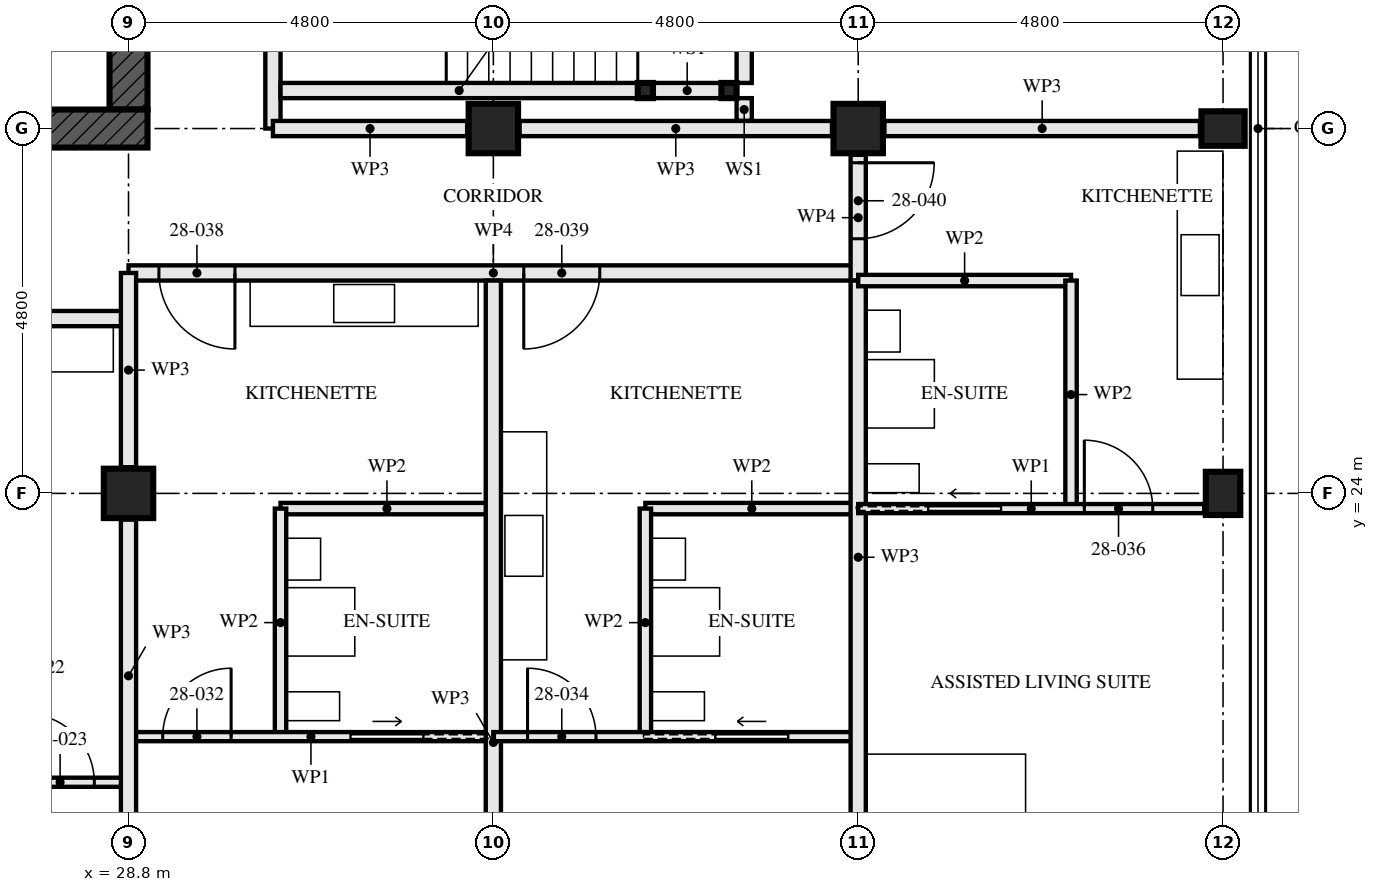
"""IFC4 building model, lengths in metres.
Left out: names, types, materials, properties, quantities, classifications, styles, units other than length and angle.
Written with IfcOpenShell. Run it as: python <this file> out.ifc"""

import sys

from ifc_helpers import new_model, si_unit, direction, frame, frame_2d, origin, origin_2d, place, context, subcontext, project, spatial, rectangle, hollow_rectangle, i_section, extrude, element, fill, save


model = new_model("IFC4")
c1 = context("Model", 3, precision=1e-05, world=origin(), true_north=direction((0.0, 1.0)))
c2 = subcontext(c1, "Body", "Model", "MODEL_VIEW")
j1 = project(units=[si_unit("LENGTHUNIT", "METRE"), si_unit("PLANEANGLEUNIT", "RADIAN")], contexts=[c1])
p1 = place(None, origin())
s1 = spatial("IfcSite", under=j1, at=p1, CompositionType="ELEMENT")
p2 = place(p1, origin())
s2 = spatial("IfcBuilding", under=s1, at=p2, CompositionType="ELEMENT")
p3 = place(p2, frame((0.0, 0.0, 105.0)))
s3 = spatial("IfcBuildingStorey", under=s2, at=p3, CompositionType="ELEMENT", Elevation=105.0)
for number, where, z_axis, x_axis in (
    (1, (28.8, 24.0, 0.0), (0.0, 0.0, 1.0), (1.0, 0.0, 0.0)),
    (2, (33.6, 28.8, 0.0), (0.0, 0.0, 1.0), (0.0, 1.0, 0.0)),
    (3, (38.4, 28.8, 0.0), (0.0, 0.0, 1.0), (0.0, 1.0, 0.0)),
):
    element("IfcColumn", number, at=place(p3, frame(where, z_axis=z_axis, x_axis=x_axis)), inside=s3, PredefinedType="COLUMN", context=c2, shape_type="SweptSolid", body=[
        extrude(hollow_rectangle(XDim=0.65, YDim=0.65, WallThickness=0.05, at=origin_2d()), origin(), (0.0, 0.0, 1.0), 3.5),
    ])
for number, where, z_axis, x_axis in (
    (4, (43.2, 24.0, 0.0), (0.0, 0.0, 1.0), (1.0, 0.0, 0.0)),
    (5, (43.2, 28.8, 0.0), (0.0, 0.0, 1.0), (0.0, 1.0, 0.0)),
):
    element("IfcColumn", number, at=place(p3, frame(where, z_axis=z_axis, x_axis=x_axis)), inside=s3, PredefinedType="COLUMN", context=c2, shape_type="SweptSolid", body=[
        extrude(i_section(OverallWidth=0.454, OverallDepth=0.569, WebThickness=0.078, FlangeThickness=0.125, FilletRadius=0.015, at=origin_2d()), origin(), (0.0, 0.0, 1.0), 3.5),
    ])
p4 = place(p3, frame((14.15, 28.8, -0.17), z_axis=(0.0, 0.0, 1.0), x_axis=(1.0, 0.0, 0.0)))
e6 = element("IfcWall", 6, at=p4, inside=s3, PredefinedType="SHEAR", context=c2, shape_type="SweptSolid", body=[
    extrude(rectangle(XDim=14.9, YDim=0.5, at=frame_2d((7.45, 0.0))), origin(), (0.0, 0.0, 1.0), 3.5),
])
p5 = place(p4, frame((6.85, 0.0, 0.17)))
e7 = element("IfcOpeningElement", 7, at=p5, cuts=e6, PredefinedType="OPENING", context=c2, shape_type="SweptSolid", body=[
    extrude(rectangle(XDim=1.2, YDim=2.1, at=frame_2d((0.6, 1.05))), frame((0.0, 0.26, 0.0), z_axis=(0.0, -1.0, 0.0), x_axis=(1.0, 0.0, 0.0)), (0.0, 0.0, 1.0), 0.521),
])
p6 = place(p3, frame((28.8, 29.05, -0.17), z_axis=(0.0, 0.0, 1.0), x_axis=(0.0, 1.0, 0.0)))
e8 = element("IfcWall", 8, at=p6, inside=s3, PredefinedType="SHEAR", context=c2, shape_type="SweptSolid", body=[
    extrude(rectangle(XDim=13.9, YDim=0.5, at=frame_2d((6.95, 0.0))), origin(), (0.0, 0.0, 1.0), 3.5),
])
p7 = place(p6, frame((6.35, 0.0, 0.17)))
e9 = element("IfcOpeningElement", 9, at=p7, cuts=e8, PredefinedType="OPENING", context=c2, shape_type="SweptSolid", body=[
    extrude(rectangle(XDim=1.2, YDim=2.1, at=frame_2d((0.6, 1.05))), frame((0.0, 0.26, 0.0), z_axis=(0.0, -1.0, 0.0), x_axis=(1.0, 0.0, 0.0)), (0.0, 0.0, 1.0), 0.521),
])
for number, where, z_axis, x_axis in (
    (10, (36.7, 29.3, 0.0), (0.0, 0.0, 1.0), (1.0, 0.0, 0.0)),
    (11, (35.6, 29.3, 0.0), (0.0, 0.0, 1.0), (1.0, 0.0, 0.0)),
):
    element("IfcColumn", number, at=place(p3, frame(where, z_axis=z_axis, x_axis=x_axis)), inside=s3, PredefinedType="COLUMN", context=c2, shape_type="SweptSolid", body=[
        extrude(hollow_rectangle(XDim=0.2, YDim=0.2, WallThickness=0.008, at=origin_2d()), origin(), (0.0, 0.0, 1.0), 3.33),
    ])
p8 = place(p3, frame((24.0, 20.2, 0.0), z_axis=(0.0, 0.0, 1.0), x_axis=(1.0, 0.0, 0.0)))
e12 = element("IfcWall", 12, at=p8, inside=s3, PredefinedType="PARTITIONING", context=c2, shape_type="SweptSolid", body=[
    extrude(rectangle(XDim=4.8, YDim=0.12, at=frame_2d((2.4, 0.0))), origin(), (0.0, 0.0, 1.0), 3.33),
])
p9 = place(p8, frame((3.45, 0.0, 0.0)))
e13 = element("IfcOpeningElement", 13, at=p9, cuts=e12, PredefinedType="OPENING", context=c2, shape_type="SweptSolid", body=[
    extrude(rectangle(XDim=0.9, YDim=2.1, at=frame_2d((0.45, 1.05))), frame((0.0, 0.071, 0.0), z_axis=(0.0, -1.0, 0.0), x_axis=(1.0, 0.0, 0.0)), (0.0, 0.0, 1.0), 0.141),
])
p10 = place(p3, frame((17.8, 26.3, 0.0), z_axis=(0.0, 0.0, 1.0), x_axis=(1.0, 0.0, 0.0)))
e14 = element("IfcWall", 14, at=p10, inside=s3, PredefinedType="PARTITIONING", context=c2, shape_type="SweptSolid", body=[
    extrude(rectangle(XDim=11.0, YDim=0.2, at=frame_2d((5.5, 0.0))), origin(), (0.0, 0.0, 1.0), 2.55),
])
p11 = place(p10, frame((0.06, 0.0, 0.0)))
e15 = element("IfcOpeningElement", 15, at=p11, cuts=e14, PredefinedType="OPENING", context=c2, shape_type="SweptSolid", body=[
    extrude(rectangle(XDim=1.0, YDim=2.1, at=frame_2d((0.5, 1.05))), frame((0.0, 0.111, 0.0), z_axis=(0.0, -1.0, 0.0), x_axis=(1.0, 0.0, 0.0)), (0.0, 0.0, 1.0), 0.221),
])
p12 = place(p10, frame((6.6, 0.0, 0.0)))
e16 = element("IfcOpeningElement", 16, at=p12, cuts=e14, PredefinedType="OPENING", context=c2, shape_type="SweptSolid", body=[
    extrude(rectangle(XDim=1.0, YDim=2.1, at=frame_2d((0.5, 1.05))), frame((0.0, 0.111, 0.0), z_axis=(0.0, -1.0, 0.0), x_axis=(1.0, 0.0, 0.0)), (0.0, 0.0, 1.0), 0.221),
])
p13 = place(p3, frame((30.8, 20.8, 0.0), z_axis=(0.0, 0.0, 1.0), x_axis=(0.0, 1.0, 0.0)))
e17 = element("IfcWall", 17, at=p13, inside=s3, PredefinedType="PARTITIONING", context=c2, shape_type="SweptSolid", body=[
    extrude(rectangle(XDim=3.0, YDim=0.15, at=frame_2d((1.5, 0.0))), origin(), (0.0, 0.0, 1.0), 3.33),
])
p14 = place(p3, frame((30.8, 23.8, 0.0), z_axis=(0.0, 0.0, 1.0), x_axis=(1.0, 0.0, 0.0)))
e18 = element("IfcWall", 18, at=p14, inside=s3, PredefinedType="PARTITIONING", context=c2, shape_type="SweptSolid", body=[
    extrude(rectangle(XDim=2.8, YDim=0.15, at=frame_2d((1.4, 0.0))), origin(), (0.0, 0.0, 1.0), 3.33),
])
p15 = place(p3, frame((28.8, 20.8, 0.0), z_axis=(0.0, 0.0, 1.0), x_axis=(1.0, 0.0, 0.0)))
e19 = element("IfcWall", 19, at=p15, inside=s3, PredefinedType="PARTITIONING", context=c2, shape_type="SweptSolid", body=[
    extrude(rectangle(XDim=4.8, YDim=0.12, at=frame_2d((2.4, 0.0))), origin(), (0.0, 0.0, 1.0), 3.33),
])
p16 = place(p15, frame((0.45, 0.0, 0.0)))
e20 = element("IfcOpeningElement", 20, at=p16, cuts=e19, PredefinedType="OPENING", context=c2, shape_type="SweptSolid", body=[
    extrude(rectangle(XDim=0.9, YDim=2.1, at=frame_2d((0.45, 1.05))), frame((0.0, 0.071, 0.0), z_axis=(0.0, -1.0, 0.0), x_axis=(1.0, 0.0, 0.0)), (0.0, 0.0, 1.0), 0.141),
])
p17 = place(p15, frame((2.925, 0.0, 0.0)))
e21 = element("IfcOpeningElement", 21, at=p17, cuts=e19, PredefinedType="OPENING", context=c2, shape_type="SweptSolid", body=[
    extrude(rectangle(XDim=0.95, YDim=2.1, at=frame_2d((0.475, 1.05))), frame((0.0, 0.071, 0.0), z_axis=(0.0, -1.0, 0.0), x_axis=(1.0, 0.0, 0.0)), (0.0, 0.0, 1.0), 0.141),
])
p18 = place(p3, frame((33.6, 14.647, 0.0), z_axis=(0.0, 0.0, 1.0), x_axis=(0.0, 1.0, 0.0)))
e22 = element("IfcWall", 22, at=p18, inside=s3, PredefinedType="PARTITIONING", context=c2, shape_type="SweptSolid", body=[
    extrude(rectangle(XDim=12.153, YDim=0.2, at=frame_2d((6.077, 0.0))), origin(), (0.0, 0.0, 1.0), 2.55),
])
p19 = place(p3, frame((35.6, 20.8, 0.0), z_axis=(0.0, 0.0, 1.0), x_axis=(0.0, 1.0, 0.0)))
e23 = element("IfcWall", 23, at=p19, inside=s3, PredefinedType="PARTITIONING", context=c2, shape_type="SweptSolid", body=[
    extrude(rectangle(XDim=3.0, YDim=0.15, at=frame_2d((1.5, 0.0))), origin(), (0.0, 0.0, 1.0), 3.33),
])
p20 = place(p3, frame((35.6, 23.8, 0.0), z_axis=(0.0, 0.0, 1.0), x_axis=(1.0, 0.0, 0.0)))
e24 = element("IfcWall", 24, at=p20, inside=s3, PredefinedType="PARTITIONING", context=c2, shape_type="SweptSolid", body=[
    extrude(rectangle(XDim=2.8, YDim=0.15, at=frame_2d((1.4, 0.0))), origin(), (0.0, 0.0, 1.0), 3.33),
])
p21 = place(p3, frame((33.6, 20.8, 0.0), z_axis=(0.0, 0.0, 1.0), x_axis=(1.0, 0.0, 0.0)))
e25 = element("IfcWall", 25, at=p21, inside=s3, PredefinedType="PARTITIONING", context=c2, shape_type="SweptSolid", body=[
    extrude(rectangle(XDim=4.8, YDim=0.12, at=frame_2d((2.4, 0.0))), origin(), (0.0, 0.0, 1.0), 3.33),
])
p22 = place(p21, frame((0.45, 0.0, 0.0)))
e26 = element("IfcOpeningElement", 26, at=p22, cuts=e25, PredefinedType="OPENING", context=c2, shape_type="SweptSolid", body=[
    extrude(rectangle(XDim=0.9, YDim=2.1, at=frame_2d((0.45, 1.05))), frame((0.0, 0.071, 0.0), z_axis=(0.0, -1.0, 0.0), x_axis=(1.0, 0.0, 0.0)), (0.0, 0.0, 1.0), 0.141),
])
p23 = place(p21, frame((2.925, 0.0, 0.0)))
e27 = element("IfcOpeningElement", 27, at=p23, cuts=e25, PredefinedType="OPENING", context=c2, shape_type="SweptSolid", body=[
    extrude(rectangle(XDim=0.95, YDim=2.1, at=frame_2d((0.475, 1.05))), frame((0.0, 0.071, 0.0), z_axis=(0.0, -1.0, 0.0), x_axis=(1.0, 0.0, 0.0)), (0.0, 0.0, 1.0), 0.141),
])
p24 = place(p3, frame((38.4, 19.52, 0.0), z_axis=(0.0, 0.0, 1.0), x_axis=(0.0, 1.0, 0.0)))
e28 = element("IfcWall", 28, at=p24, inside=s3, PredefinedType="PARTITIONING", context=c2, shape_type="SweptSolid", body=[
    extrude(rectangle(XDim=7.28, YDim=0.2, at=frame_2d((3.64, 0.0))), origin(), (0.0, 0.0, 1.0), 2.55),
])
p25 = place(p3, frame((41.2, 23.8, 0.0), z_axis=(0.0, 0.0, 1.0), x_axis=(0.0, 1.0, 0.0)))
e29 = element("IfcWall", 29, at=p25, inside=s3, PredefinedType="PARTITIONING", context=c2, shape_type="SweptSolid", body=[
    extrude(rectangle(XDim=3.0, YDim=0.15, at=frame_2d((1.5, 0.0))), origin(), (0.0, 0.0, 1.0), 2.55),
])
p26 = place(p3, frame((38.4, 26.8, 0.0), z_axis=(0.0, 0.0, 1.0), x_axis=(1.0, 0.0, 0.0)))
e30 = element("IfcWall", 30, at=p26, inside=s3, PredefinedType="PARTITIONING", context=c2, shape_type="SweptSolid", body=[
    extrude(rectangle(XDim=2.8, YDim=0.15, at=frame_2d((1.4, 0.0))), origin(), (0.0, 0.0, 1.0), 3.33),
])
p27 = place(p3, frame((38.4, 23.8, 0.0), z_axis=(0.0, 0.0, 1.0), x_axis=(1.0, 0.0, 0.0)))
e31 = element("IfcWall", 31, at=p27, inside=s3, PredefinedType="PARTITIONING", context=c2, shape_type="SweptSolid", body=[
    extrude(rectangle(XDim=4.553, YDim=0.12, at=frame_2d((2.276, 0.0))), origin(), (0.0, 0.0, 1.0), 3.33),
])
p28 = place(p27, frame((2.975, 0.0, 0.0)))
e32 = element("IfcOpeningElement", 32, at=p28, cuts=e31, PredefinedType="OPENING", context=c2, shape_type="SweptSolid", body=[
    extrude(rectangle(XDim=0.9, YDim=2.1, at=frame_2d((0.45, 1.05))), frame((0.0, 0.071, 0.0), z_axis=(0.0, -1.0, 0.0), x_axis=(1.0, 0.0, 0.0)), (0.0, 0.0, 1.0), 0.141),
])
p29 = place(p27, frame((0.925, 0.0, 0.0)))
e33 = element("IfcOpeningElement", 33, at=p29, cuts=e31, PredefinedType="OPENING", context=c2, shape_type="SweptSolid", body=[
    extrude(rectangle(XDim=0.95, YDim=2.1, at=frame_2d((0.475, 1.05))), frame((0.0, 0.071, 0.0), z_axis=(0.0, -1.0, 0.0), x_axis=(1.0, 0.0, 0.0)), (0.0, 0.0, 1.0), 0.141),
])
p30 = place(p3, frame((28.8, 26.9, 0.0), z_axis=(0.0, 0.0, 1.0), x_axis=(1.0, 0.0, 0.0)))
e34 = element("IfcWall", 34, at=p30, inside=s3, PredefinedType="PARTITIONING", context=c2, shape_type="SweptSolid", body=[
    extrude(rectangle(XDim=9.6, YDim=0.2, at=frame_2d((4.8, 0.0))), origin(), (0.0, 0.0, 1.0), 3.33),
])
p31 = place(p30, frame((0.4, 0.0, 0.0)))
e35 = element("IfcOpeningElement", 35, at=p31, cuts=e34, PredefinedType="OPENING", context=c2, shape_type="SweptSolid", body=[
    extrude(rectangle(XDim=1.0, YDim=2.1, at=frame_2d((0.5, 1.05))), frame((0.0, 0.111, 0.0), z_axis=(0.0, -1.0, 0.0), x_axis=(1.0, 0.0, 0.0)), (0.0, 0.0, 1.0), 0.221),
])
p32 = place(p30, frame((5.2, 0.0, 0.0)))
e36 = element("IfcOpeningElement", 36, at=p32, cuts=e34, PredefinedType="OPENING", context=c2, shape_type="SweptSolid", body=[
    extrude(rectangle(XDim=1.0, YDim=2.1, at=frame_2d((0.5, 1.05))), frame((0.0, 0.111, 0.0), z_axis=(0.0, -1.0, 0.0), x_axis=(1.0, 0.0, 0.0)), (0.0, 0.0, 1.0), 0.221),
])
p33 = place(p3, frame((38.4, 26.8, 0.0), z_axis=(0.0, 0.0, 1.0), x_axis=(0.0, 1.0, 0.0)))
e37 = element("IfcWall", 37, at=p33, inside=s3, PredefinedType="PARTITIONING", context=c2, shape_type="SweptSolid", body=[
    extrude(rectangle(XDim=1.655, YDim=0.2, at=frame_2d((0.828, 0.0))), origin(), (0.0, 0.0, 1.0), 3.33),
])
p34 = place(p33, frame((0.55, 0.0, 0.0)))
e38 = element("IfcOpeningElement", 38, at=p34, cuts=e37, PredefinedType="OPENING", context=c2, shape_type="SweptSolid", body=[
    extrude(rectangle(XDim=1.0, YDim=2.1, at=frame_2d((0.5, 1.05))), frame((0.0, 0.111, 0.0), z_axis=(0.0, -1.0, 0.0), x_axis=(1.0, 0.0, 0.0)), (0.0, 0.0, 1.0), 0.221),
])
p35 = place(p3, frame((36.6, 29.3, 0.0), z_axis=(0.0, 0.0, 1.0), x_axis=(-1.0, 0.0, 0.0)))
e39 = element("IfcWall", 39, at=p35, inside=s3, PredefinedType="SOLIDWALL", context=c2, shape_type="SweptSolid", body=[
    extrude(rectangle(XDim=0.9, YDim=0.2, at=frame_2d((0.45, 0.0))), origin(), (0.0, 0.0, 1.0), 2.99),
])
p36 = place(p3, frame((35.5, 29.3, 0.0), z_axis=(0.0, 0.0, 1.0), x_axis=(-1.0, 0.0, 0.0)))
e40 = element("IfcWall", 40, at=p36, inside=s3, PredefinedType="SOLIDWALL", context=c2, shape_type="SweptSolid", body=[
    extrude(rectangle(XDim=4.7, YDim=0.2, at=frame_2d((2.35, 0.0))), origin(), (0.0, 0.0, 1.0), 2.99),
])
p37 = place(p3, frame((36.9, 28.9, 0.0), z_axis=(0.0, 0.0, 1.0), x_axis=(0.0, 1.0, 0.0)))
e41 = element("IfcWall", 41, at=p37, inside=s3, PredefinedType="SOLIDWALL", context=c2, shape_type="SweptSolid", body=[
    extrude(rectangle(XDim=0.3, YDim=0.2, at=frame_2d((0.15, 0.0))), origin(), (0.0, 0.0, 1.0), 3.33),
])
p38 = place(p3, frame((36.9, 29.4, 0.0), z_axis=(0.0, 0.0, 1.0), x_axis=(0.0, 1.0, 0.0)))
e42 = element("IfcWall", 42, at=p38, inside=s3, PredefinedType="SOLIDWALL", context=c2, shape_type="SweptSolid", body=[
    extrude(rectangle(XDim=2.6, YDim=0.2, at=frame_2d((1.3, 0.0))), origin(), (0.0, 0.0, 1.0), 3.33),
])
p39 = place(p3, frame((30.7, 28.8, 0.0), z_axis=(0.0, 0.0, 1.0), x_axis=(0.0, 1.0, 0.0)))
e43 = element("IfcWall", 43, at=p39, inside=s3, PredefinedType="PARTITIONING", context=c2, shape_type="SweptSolid", body=[
    extrude(rectangle(XDim=14.84, YDim=0.2, at=frame_2d((7.42, 0.0))), origin(), (0.0, 0.0, 1.0), 2.32),
])
p40 = place(p39, frame((1.4, 0.0, 0.0)))
e44 = element("IfcOpeningElement", 44, at=p40, cuts=e43, PredefinedType="OPENING", context=c2, shape_type="SweptSolid", body=[
    extrude(rectangle(XDim=1.0, YDim=2.1, at=frame_2d((0.5, 1.05))), frame((0.0, 0.111, 0.0), z_axis=(0.0, -1.0, 0.0), x_axis=(1.0, 0.0, 0.0)), (0.0, 0.0, 1.0), 0.221),
])
p41 = place(p39, frame((4.1, 0.0, 0.0)))
e45 = element("IfcOpeningElement", 45, at=p41, cuts=e43, PredefinedType="OPENING", context=c2, shape_type="SweptSolid", body=[
    extrude(rectangle(XDim=1.0, YDim=2.1, at=frame_2d((0.5, 1.05))), frame((0.0, 0.111, 0.0), z_axis=(0.0, -1.0, 0.0), x_axis=(1.0, 0.0, 0.0)), (0.0, 0.0, 1.0), 0.221),
])
p42 = place(p39, frame((5.975, 0.0, 0.0)))
e46 = element("IfcOpeningElement", 46, at=p42, cuts=e43, PredefinedType="OPENING", context=c2, shape_type="SweptSolid", body=[
    extrude(rectangle(XDim=1.0, YDim=2.1, at=frame_2d((0.5, 1.05))), frame((0.0, 0.111, 0.0), z_axis=(0.0, -1.0, 0.0), x_axis=(1.0, 0.0, 0.0)), (0.0, 0.0, 1.0), 0.221),
])
p43 = place(p39, frame((13.0, 0.0, 0.0)))
e47 = element("IfcOpeningElement", 47, at=p43, cuts=e43, PredefinedType="OPENING", context=c2, shape_type="SweptSolid", body=[
    extrude(rectangle(XDim=1.0, YDim=2.1, at=frame_2d((0.5, 1.05))), frame((0.0, 0.111, 0.0), z_axis=(0.0, -1.0, 0.0), x_axis=(1.0, 0.0, 0.0)), (0.0, 0.0, 1.0), 0.221),
])
p44 = place(p3, frame((28.8, 19.545, 0.0), z_axis=(0.0, 0.0, 1.0), x_axis=(0.0, 1.0, 0.0)))
e48 = element("IfcWall", 48, at=p44, inside=s3, PredefinedType="PARTITIONING", context=c2, shape_type="SweptSolid", body=[
    extrude(rectangle(XDim=4.11, YDim=0.2, at=frame_2d((2.055, 0.0))), origin(), (0.0, 0.0, 1.0), 2.32),
])
p45 = place(p3, frame((28.8, 24.345, 0.0), z_axis=(0.0, 0.0, 1.0), x_axis=(0.0, 1.0, 0.0)))
e49 = element("IfcWall", 49, at=p45, inside=s3, PredefinedType="PARTITIONING", context=c2, shape_type="SweptSolid", body=[
    extrude(rectangle(XDim=2.555, YDim=0.2, at=frame_2d((1.277, 0.0))), origin(), (0.0, 0.0, 1.0), 2.32),
])
p46 = place(p3, frame((42.896, 28.8, 0.0), z_axis=(0.0, 0.0, 1.0), x_axis=(-1.0, 0.0, 0.0)))
e50 = element("IfcWall", 50, at=p46, inside=s3, PredefinedType="PARTITIONING", context=c2, shape_type="SweptSolid", body=[
    extrude(rectangle(XDim=4.15, YDim=0.2, at=frame_2d((2.075, 0.0))), origin(), (0.0, 0.0, 1.0), 2.32),
])
p47 = place(p3, frame((38.055, 28.8, 0.0), z_axis=(0.0, 0.0, 1.0), x_axis=(-1.0, 0.0, 0.0)))
e51 = element("IfcWall", 51, at=p47, inside=s3, PredefinedType="PARTITIONING", context=c2, shape_type="SweptSolid", body=[
    extrude(rectangle(XDim=4.11, YDim=0.2, at=frame_2d((2.055, 0.0))), origin(), (0.0, 0.0, 1.0), 2.32),
])
p48 = place(p3, frame((33.255, 28.8, 0.0), z_axis=(0.0, 0.0, 1.0), x_axis=(-1.0, 0.0, 0.0)))
e52 = element("IfcWall", 52, at=p48, inside=s3, PredefinedType="PARTITIONING", context=c2, shape_type="SweptSolid", body=[
    extrude(rectangle(XDim=2.555, YDim=0.2, at=frame_2d((1.277, 0.0))), origin(), (0.0, 0.0, 1.0), 2.32),
])
p49 = place(p9, origin())
e53 = element("IfcDoor", 53, at=p49, inside=s3, OperationType="SINGLE_SWING_RIGHT", PredefinedType="DOOR", context=c2, shape_type="SweptSolid", body=[
    extrude(rectangle(XDim=0.9, YDim=2.1, at=frame_2d((0.45, 1.05))), frame((0.0, 0.022, 0.0), z_axis=(0.0, -1.0, 0.0), x_axis=(1.0, 0.0, 0.0)), (0.0, 0.0, 1.0), 0.044),
])
fill(e13, e53)
p50 = place(p16, origin())
e54 = element("IfcDoor", 54, at=p50, inside=s3, OperationType="SINGLE_SWING_LEFT", PredefinedType="DOOR", context=c2, shape_type="SweptSolid", body=[
    extrude(rectangle(XDim=0.9, YDim=2.1, at=frame_2d((0.45, 1.05))), frame((0.0, 0.022, 0.0), z_axis=(0.0, -1.0, 0.0), x_axis=(1.0, 0.0, 0.0)), (0.0, 0.0, 1.0), 0.044),
])
fill(e20, e54)
p51 = place(p17, origin())
e55 = element("IfcDoor", 55, at=p51, inside=s3, OperationType="SLIDING_TO_LEFT", PredefinedType="DOOR", context=c2, shape_type="SweptSolid", body=[
    extrude(rectangle(XDim=0.95, YDim=2.1, at=frame_2d((0.475, 1.05))), frame((0.0, 0.022, 0.0), z_axis=(0.0, -1.0, 0.0), x_axis=(1.0, 0.0, 0.0)), (0.0, 0.0, 1.0), 0.044),
])
fill(e21, e55)
p52 = place(p22, origin())
e56 = element("IfcDoor", 56, at=p52, inside=s3, OperationType="SINGLE_SWING_RIGHT", PredefinedType="DOOR", context=c2, shape_type="SweptSolid", body=[
    extrude(rectangle(XDim=0.9, YDim=2.1, at=frame_2d((0.45, 1.05))), frame((0.0, 0.022, 0.0), z_axis=(0.0, -1.0, 0.0), x_axis=(1.0, 0.0, 0.0)), (0.0, 0.0, 1.0), 0.044),
])
fill(e26, e56)
p53 = place(p23, origin())
e57 = element("IfcDoor", 57, at=p53, inside=s3, OperationType="SLIDING_TO_RIGHT", PredefinedType="DOOR", context=c2, shape_type="SweptSolid", body=[
    extrude(rectangle(XDim=0.95, YDim=2.1, at=frame_2d((0.475, 1.05))), frame((0.0, 0.022, 0.0), z_axis=(0.0, -1.0, 0.0), x_axis=(1.0, 0.0, 0.0)), (0.0, 0.0, 1.0), 0.044),
])
fill(e27, e57)
p54 = place(p28, origin())
e58 = element("IfcDoor", 58, at=p54, inside=s3, OperationType="SINGLE_SWING_RIGHT", PredefinedType="DOOR", context=c2, shape_type="SweptSolid", body=[
    extrude(rectangle(XDim=0.9, YDim=2.1, at=frame_2d((0.45, 1.05))), frame((0.0, 0.022, 0.0), z_axis=(0.0, -1.0, 0.0), x_axis=(1.0, 0.0, 0.0)), (0.0, 0.0, 1.0), 0.044),
])
fill(e32, e58)
p55 = place(p29, origin())
e59 = element("IfcDoor", 59, at=p55, inside=s3, OperationType="SLIDING_TO_RIGHT", PredefinedType="DOOR", context=c2, shape_type="SweptSolid", body=[
    extrude(rectangle(XDim=0.95, YDim=2.1, at=frame_2d((0.475, 1.05))), frame((0.0, 0.022, 0.0), z_axis=(0.0, -1.0, 0.0), x_axis=(1.0, 0.0, 0.0)), (0.0, 0.0, 1.0), 0.044),
])
fill(e33, e59)
p56 = place(p31, frame((1.0, 0.0, 0.0), z_axis=(0.0, 0.0, 1.0), x_axis=(-1.0, 0.0, 0.0)))
e60 = element("IfcDoor", 60, at=p56, inside=s3, OperationType="SINGLE_SWING_RIGHT", PredefinedType="DOOR", context=c2, shape_type="SweptSolid", body=[
    extrude(rectangle(XDim=1.0, YDim=2.1, at=frame_2d((0.5, 1.05))), frame((0.0, 0.027, 0.0), z_axis=(0.0, -1.0, 0.0), x_axis=(1.0, 0.0, 0.0)), (0.0, 0.0, 1.0), 0.054),
])
fill(e35, e60)
p57 = place(p32, frame((1.0, 0.0, 0.0), z_axis=(0.0, 0.0, 1.0), x_axis=(-1.0, 0.0, 0.0)))
e61 = element("IfcDoor", 61, at=p57, inside=s3, OperationType="SINGLE_SWING_LEFT", PredefinedType="DOOR", context=c2, shape_type="SweptSolid", body=[
    extrude(rectangle(XDim=1.0, YDim=2.1, at=frame_2d((0.5, 1.05))), frame((0.0, 0.027, 0.0), z_axis=(0.0, -1.0, 0.0), x_axis=(1.0, 0.0, 0.0)), (0.0, 0.0, 1.0), 0.054),
])
fill(e36, e61)
p58 = place(p34, frame((1.0, 0.0, 0.0), z_axis=(0.0, 0.0, 1.0), x_axis=(-1.0, 0.0, 0.0)))
e62 = element("IfcDoor", 62, at=p58, inside=s3, OperationType="SINGLE_SWING_RIGHT", PredefinedType="DOOR", context=c2, shape_type="SweptSolid", body=[
    extrude(rectangle(XDim=1.0, YDim=2.1, at=frame_2d((0.5, 1.05))), frame((0.0, 0.027, 0.0), z_axis=(0.0, -1.0, 0.0), x_axis=(1.0, 0.0, 0.0)), (0.0, 0.0, 1.0), 0.054),
])
fill(e38, e62)
save(model, sys.argv[1])
